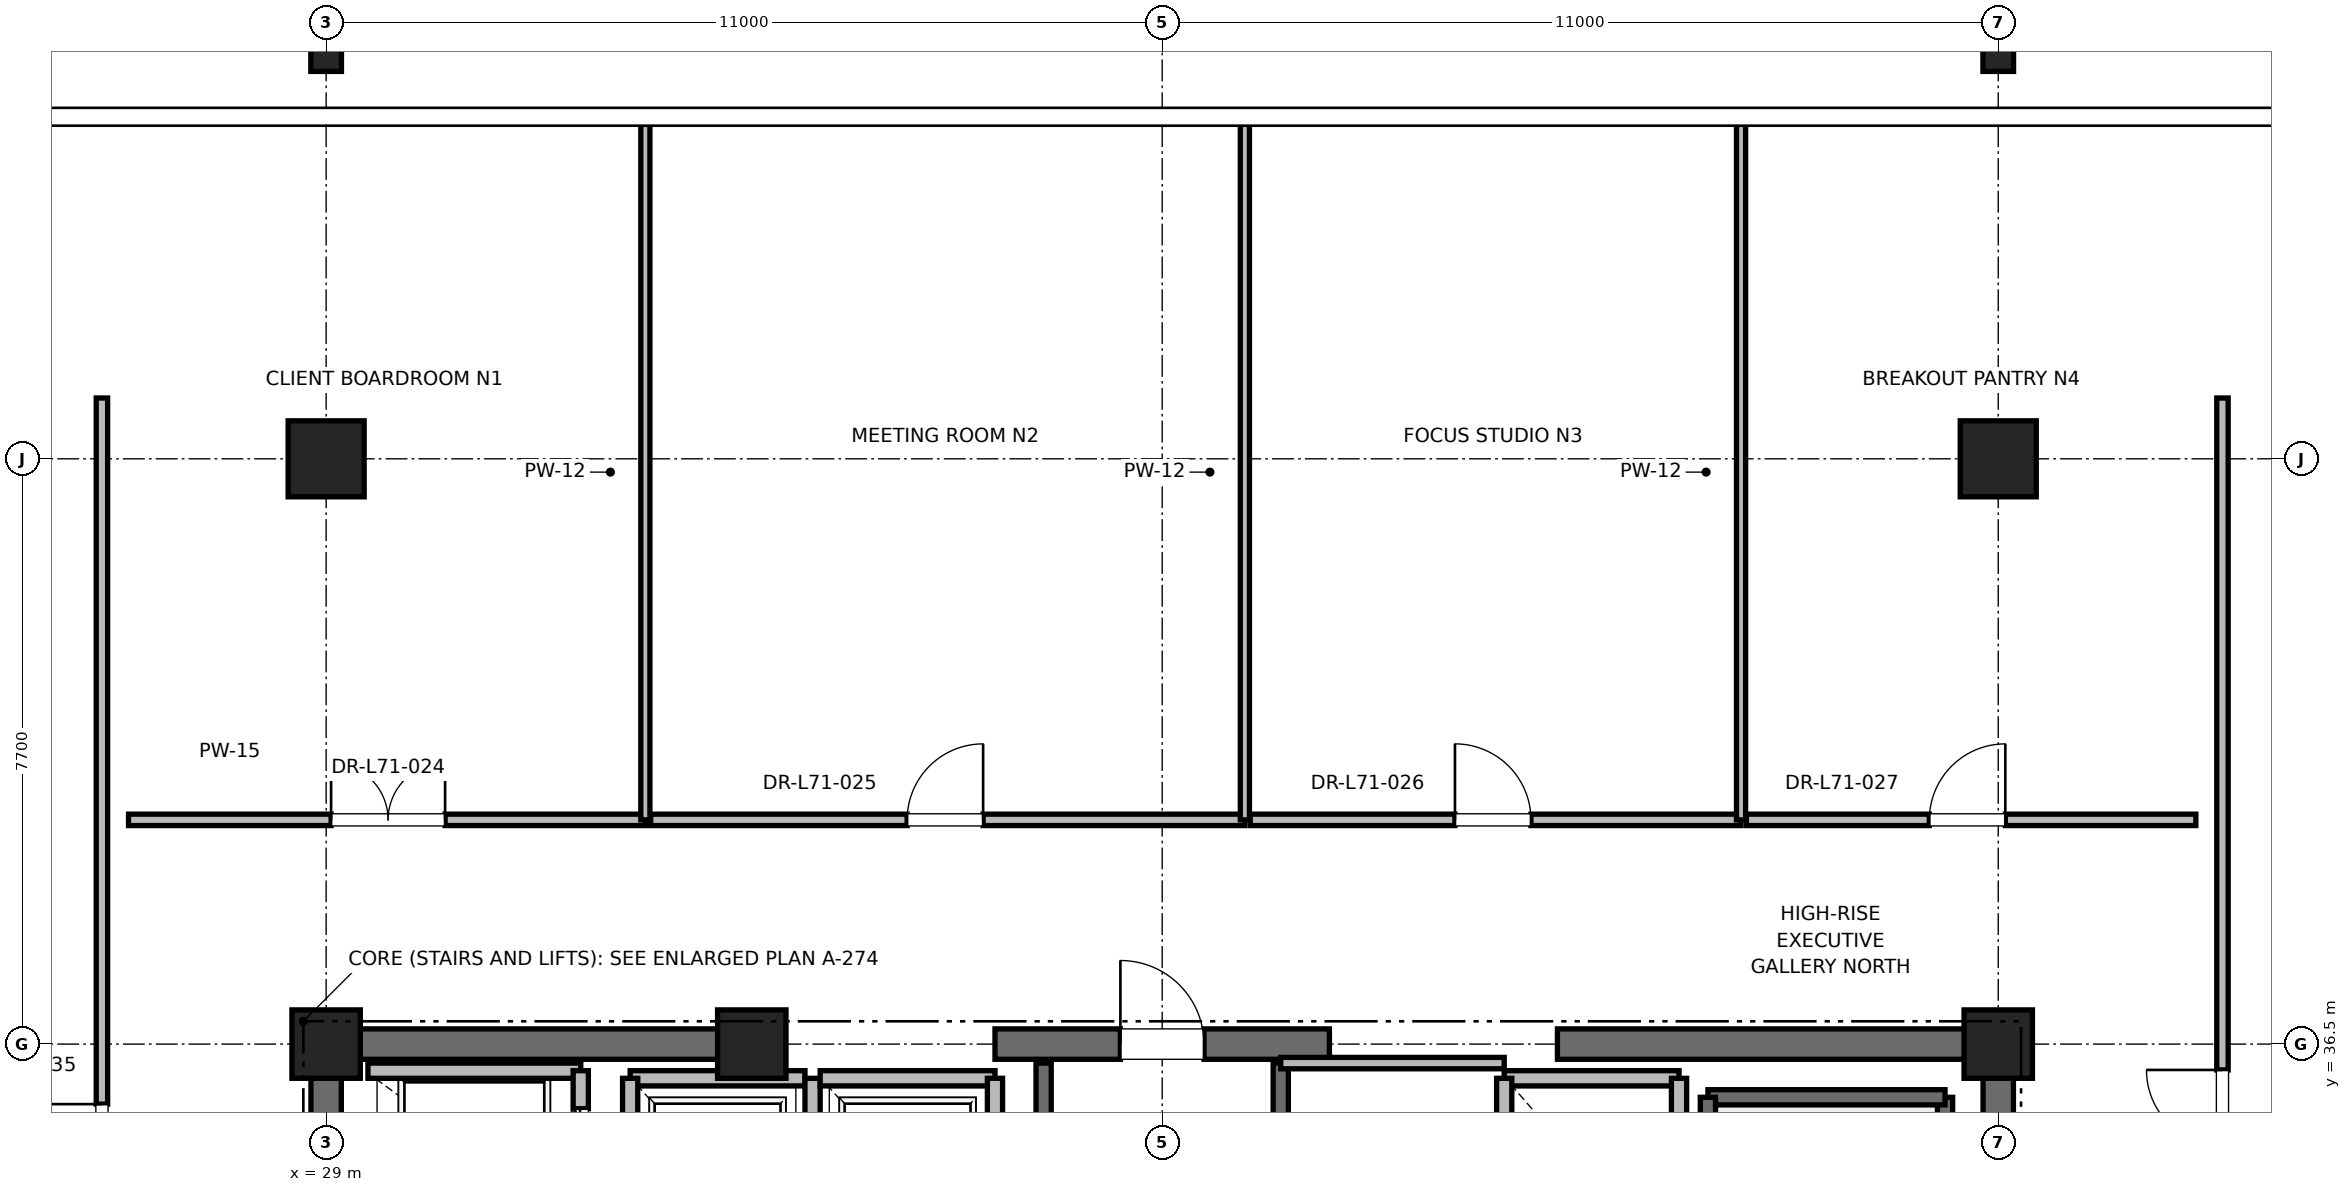
"""IFC4 building model, lengths in metres.
Left out: names, types, materials, properties, quantities, classifications, styles, units other than length and angle.
Written with IfcOpenShell. Run it as: python <this file> out.ifc"""

import sys

from ifc_helpers import new_model, si_unit, direction, frame, frame_2d, origin, origin_2d, place, context, subcontext, project, spatial, rectangle, i_section, extrude, element, fill, save


model = new_model("IFC4")
c1 = context("Model", 3, precision=1e-05, world=origin(), true_north=direction((0.0, 1.0)))
c2 = subcontext(c1, "Body", "Model", "MODEL_VIEW")
j1 = project(units=[si_unit("LENGTHUNIT", "METRE"), si_unit("PLANEANGLEUNIT", "RADIAN")], contexts=[c1])
p1 = place(None, origin())
s1 = spatial("IfcSite", under=j1, at=p1, CompositionType="ELEMENT")
p2 = place(p1, origin())
s2 = spatial("IfcBuilding", under=s1, at=p2, CompositionType="ELEMENT")
p3 = place(p2, frame((0.0, 0.0, 306.8)))
s3 = spatial("IfcBuildingStorey", under=s2, at=p3, CompositionType="ELEMENT", Elevation=306.8)
for number, where, z_axis, x_axis in (
    (1, (29.0, 44.2, 0.0), (0.0, 0.0, 1.0), (1.0, 0.0, 0.0)),
    (2, (51.0, 44.2, 0.0), (0.0, 0.0, 1.0), (1.0, 0.0, 0.0)),
):
    element("IfcColumn", number, at=place(p3, frame(where, z_axis=z_axis, x_axis=x_axis)), inside=s3, PredefinedType="COLUMN", context=c2, shape_type="SweptSolid", body=[
        extrude(rectangle(XDim=1.0, YDim=1.0, at=origin_2d()), origin(), (0.0, 0.0, 1.0), 4.0),
    ])
for number, where, z_axis, x_axis in (
    (3, (29.0, 49.5, 0.0), (0.0, 0.0, 1.0), (1.0, 0.0, 0.0)),
    (4, (51.0, 49.5, 0.0), (0.0, 0.0, 1.0), (1.0, 0.0, 0.0)),
):
    element("IfcColumn", number, at=place(p3, frame(where, z_axis=z_axis, x_axis=x_axis)), inside=s3, PredefinedType="COLUMN", context=c2, shape_type="SweptSolid", body=[
        extrude(i_section(OverallWidth=0.403, OverallDepth=0.406, WebThickness=0.027, FlangeThickness=0.043, FilletRadius=0.015, at=origin_2d()), origin(), (0.0, 0.0, 1.0), 4.0),
    ])
for number, where, z_axis, x_axis in (
    (5, (29.0, 36.5, 0.0), (0.0, 0.0, 1.0), (1.0, 0.0, 0.0)),
    (6, (51.0, 36.5, 0.0), (0.0, 0.0, 1.0), (1.0, 0.0, 0.0)),
    (7, (34.6, 36.5, 0.0), (0.0, 0.0, 1.0), (1.0, 0.0, 0.0)),
):
    element("IfcColumn", number, at=place(p3, frame(where, z_axis=z_axis, x_axis=x_axis)), inside=s3, PredefinedType="PILASTER", context=c2, shape_type="SweptSolid", body=[
        extrude(rectangle(XDim=0.9, YDim=0.9, at=origin_2d()), origin(), (0.0, 0.0, 1.0), 4.0),
    ])
p4 = place(p3, frame((29.0, 36.5, 0.0), z_axis=(0.0, 0.0, 1.0), x_axis=(1.0, 0.0, 0.0)))
e8 = element("IfcWall", 8, at=p4, inside=s3, PredefinedType="SHEAR", context=c2, shape_type="SweptSolid", body=[
    extrude(rectangle(XDim=5.8, YDim=0.4, at=frame_2d((2.9, 0.0))), origin(), (0.0, 0.0, 1.0), 3.785),
])
p5 = place(p3, frame((37.8, 36.5, 0.0), z_axis=(0.0, 0.0, 1.0), x_axis=(1.0, 0.0, 0.0)))
e9 = element("IfcWall", 9, at=p5, inside=s3, PredefinedType="SHEAR", context=c2, shape_type="SweptSolid", body=[
    extrude(rectangle(XDim=4.4, YDim=0.4, at=frame_2d((2.2, 0.0))), origin(), (0.0, 0.0, 1.0), 3.785),
])
p6 = place(p5, frame((1.65, 0.0, 0.0)))
e10 = element("IfcOpeningElement", 10, at=p6, cuts=e9, PredefinedType="OPENING", context=c2, shape_type="SweptSolid", body=[
    extrude(rectangle(XDim=1.1, YDim=2.15, at=frame_2d((0.55, 1.075))), frame((0.0, 0.2, 0.0), z_axis=(0.0, -1.0, 0.0), x_axis=(1.0, 0.0, 0.0)), (0.0, 0.0, 1.0), 0.4),
])
for number, where, z_axis, x_axis in (
    (11, (45.2, 36.5, 0.0), (0.0, 0.0, 1.0), (1.0, 0.0, 0.0)),
    (12, (29.0, 30.7, 0.0), (0.0, 0.0, 1.0), (0.0, 1.0, 0.0)),
):
    element("IfcWall", number, at=place(p3, frame(where, z_axis=z_axis, x_axis=x_axis)), inside=s3, PredefinedType="SHEAR", context=c2, shape_type="SweptSolid", body=[
        extrude(rectangle(XDim=5.8, YDim=0.4, at=frame_2d((2.9, 0.0))), origin(), (0.0, 0.0, 1.0), 3.785),
    ])
p7 = place(p3, frame((51.0, 27.7, 0.0), z_axis=(0.0, 0.0, 1.0), x_axis=(0.0, 1.0, 0.0)))
e13 = element("IfcWall", 13, at=p7, inside=s3, PredefinedType="SHEAR", context=c2, shape_type="SweptSolid", body=[
    extrude(rectangle(XDim=8.8, YDim=0.4, at=frame_2d((4.4, 0.0))), origin(), (0.0, 0.0, 1.0), 3.785),
])
p8 = place(p3, frame((50.3, 27.65, 0.0), z_axis=(0.0, 0.0, 1.0), x_axis=(0.0, 1.0, 0.0)))
e14 = element("IfcWall", 14, at=p8, inside=s3, PredefinedType="SOLIDWALL", context=c2, shape_type="SweptSolid", body=[
    extrude(rectangle(XDim=8.15, YDim=0.2, at=frame_2d((4.075, 0.0))), origin(), (0.0, 0.0, 1.0), 3.785),
])
p9 = place(p3, frame((47.18, 35.8, 0.0), z_axis=(0.0, 0.0, 1.0), x_axis=(1.0, 0.0, 0.0)))
e15 = element("IfcWall", 15, at=p9, inside=s3, PredefinedType="SOLIDWALL", context=c2, shape_type="SweptSolid", body=[
    extrude(rectangle(XDim=3.12, YDim=0.2, at=frame_2d((1.56, 0.0))), origin(), (0.0, 0.0, 1.0), 3.785),
])
p10 = place(p3, frame((47.18, 27.62, 0.0), z_axis=(0.0, 0.0, 1.0), x_axis=(0.0, 1.0, 0.0)))
e16 = element("IfcWall", 16, at=p10, inside=s3, PredefinedType="SOLIDWALL", context=c2, shape_type="SweptSolid", body=[
    extrude(rectangle(XDim=8.18, YDim=0.2, at=frame_2d((4.09, 0.0))), origin(), (0.0, 0.0, 1.0), 3.785),
])
p11 = place(p3, frame((38.44, 27.38, 0.0), z_axis=(0.0, 0.0, 1.0), x_axis=(0.0, 1.0, 0.0)))
e17 = element("IfcWall", 17, at=p11, inside=s3, PredefinedType="SOLIDWALL", context=c2, shape_type="SweptSolid", body=[
    extrude(rectangle(XDim=8.87, YDim=0.2, at=frame_2d((4.435, 0.0))), origin(), (0.0, 0.0, 1.0), 3.785),
])
p12 = place(p3, frame((41.56, 27.68, 0.0), z_axis=(0.0, 0.0, 1.0), x_axis=(0.0, 1.0, 0.0)))
e18 = element("IfcWall", 18, at=p12, inside=s3, PredefinedType="SOLIDWALL", context=c2, shape_type="SweptSolid", body=[
    extrude(rectangle(XDim=8.57, YDim=0.2, at=frame_2d((4.285, 0.0))), origin(), (0.0, 0.0, 1.0), 3.785),
])
p13 = place(p3, frame((32.35, 36.15, 0.0), z_axis=(0.0, 0.0, 1.0), x_axis=(-1.0, 0.0, 0.0)))
e19 = element("IfcWall", 19, at=p13, inside=s3, PredefinedType="SOLIDWALL", context=c2, shape_type="SweptSolid", body=[
    extrude(rectangle(XDim=2.8, YDim=0.2, at=frame_2d((1.4, 0.0))), origin(), (0.0, 0.0, 1.0), 3.22),
])
p14 = place(p3, frame((32.35, 34.05, 0.0), z_axis=(0.0, 0.0, 1.0), x_axis=(0.0, 1.0, 0.0)))
e20 = element("IfcWall", 20, at=p14, inside=s3, PredefinedType="SOLIDWALL", context=c2, shape_type="SweptSolid", body=[
    extrude(rectangle(XDim=2.1, YDim=0.2, at=frame_2d((1.05, 0.0))), origin(), (0.0, 0.0, 1.0), 3.785),
])
p15 = place(p14, frame((0.5, 0.0, 0.0)))
e21 = element("IfcOpeningElement", 21, at=p15, cuts=e20, PredefinedType="OPENING", context=c2, shape_type="SweptSolid", body=[
    extrude(rectangle(XDim=1.1, YDim=2.2, at=frame_2d((0.55, 1.1))), frame((0.0, 0.1, 0.0), z_axis=(0.0, -1.0, 0.0), x_axis=(1.0, 0.0, 0.0)), (0.0, 0.0, 1.0), 0.2),
])
p16 = place(p3, frame((35.3, 36.05, 0.0), z_axis=(0.0, 0.0, 1.0), x_axis=(-1.0, 0.0, 0.0)))
e22 = element("IfcWall", 22, at=p16, inside=s3, PredefinedType="SOLIDWALL", context=c2, shape_type="SweptSolid", body=[
    extrude(rectangle(XDim=2.3, YDim=0.2, at=frame_2d((1.15, 0.0))), origin(), (0.0, 0.0, 1.0), 2.865),
])
p17 = place(p3, frame((33.0, 36.05, 0.0), z_axis=(0.0, 0.0, 1.0), x_axis=(0.0, -1.0, 0.0)))
e23 = element("IfcWall", 23, at=p17, inside=s3, PredefinedType="SOLIDWALL", context=c2, shape_type="SweptSolid", body=[
    extrude(rectangle(XDim=2.6, YDim=0.2, at=frame_2d((1.3, 0.0))), origin(), (0.0, 0.0, 1.0), 3.785),
])
p18 = place(p3, frame((35.4, 33.45, 0.0), z_axis=(0.0, 0.0, 1.0), x_axis=(0.0, 1.0, 0.0)))
e24 = element("IfcWall", 24, at=p18, inside=s3, PredefinedType="SOLIDWALL", context=c2, shape_type="SweptSolid", body=[
    extrude(rectangle(XDim=2.6, YDim=0.2, at=frame_2d((1.3, 0.0))), origin(), (0.0, 0.0, 1.0), 2.865),
])
p19 = place(p3, frame((37.8, 36.05, 0.0), z_axis=(0.0, 0.0, 1.0), x_axis=(-1.0, 0.0, 0.0)))
e25 = element("IfcWall", 25, at=p19, inside=s3, PredefinedType="SOLIDWALL", context=c2, shape_type="SweptSolid", body=[
    extrude(rectangle(XDim=2.3, YDim=0.2, at=frame_2d((1.15, 0.0))), origin(), (0.0, 0.0, 1.0), 2.865),
])
p20 = place(p3, frame((37.8, 33.45, 0.0), z_axis=(0.0, 0.0, 1.0), x_axis=(0.0, 1.0, 0.0)))
e26 = element("IfcWall", 26, at=p20, inside=s3, PredefinedType="SOLIDWALL", context=c2, shape_type="SweptSolid", body=[
    extrude(rectangle(XDim=2.6, YDim=0.2, at=frame_2d((1.3, 0.0))), origin(), (0.0, 0.0, 1.0), 2.865),
])
p21 = place(p3, frame((46.8, 36.05, 0.0), z_axis=(0.0, 0.0, 1.0), x_axis=(-1.0, 0.0, 0.0)))
e27 = element("IfcWall", 27, at=p21, inside=s3, PredefinedType="SOLIDWALL", context=c2, shape_type="SweptSolid", body=[
    extrude(rectangle(XDim=2.3, YDim=0.2, at=frame_2d((1.15, 0.0))), origin(), (0.0, 0.0, 1.0), 2.865),
])
p22 = place(p3, frame((44.5, 36.05, 0.0), z_axis=(0.0, 0.0, 1.0), x_axis=(0.0, -1.0, 0.0)))
e28 = element("IfcWall", 28, at=p22, inside=s3, PredefinedType="SOLIDWALL", context=c2, shape_type="SweptSolid", body=[
    extrude(rectangle(XDim=2.6, YDim=0.2, at=frame_2d((1.3, 0.0))), origin(), (0.0, 0.0, 1.0), 2.865),
])
p23 = place(p3, frame((46.8, 33.45, 0.0), z_axis=(0.0, 0.0, 1.0), x_axis=(0.0, 1.0, 0.0)))
e29 = element("IfcWall", 29, at=p23, inside=s3, PredefinedType="SOLIDWALL", context=c2, shape_type="SweptSolid", body=[
    extrude(rectangle(XDim=2.6, YDim=0.2, at=frame_2d((1.3, 0.0))), origin(), (0.0, 0.0, 1.0), 3.785),
])
p24 = place(p3, frame((41.56, 36.25, 0.0), z_axis=(0.0, 0.0, 1.0), x_axis=(1.0, 0.0, 0.0)))
e30 = element("IfcWall", 30, at=p24, inside=s3, PredefinedType="PARTITIONING", context=c2, shape_type="SweptSolid", body=[
    extrude(rectangle(XDim=2.94, YDim=0.15, at=frame_2d((1.47, 0.0))), origin(), (0.0, 0.0, 1.0), 2.85),
])
p25 = place(p3, frame((26.4, 39.45, 0.0), z_axis=(0.0, 0.0, 1.0), x_axis=(1.0, 0.0, 0.0)))
e31 = element("IfcWall", 31, at=p25, inside=s3, PredefinedType="PARTITIONING", context=c2, shape_type="SweptSolid", body=[
    extrude(rectangle(XDim=6.8, YDim=0.15, at=frame_2d((3.4, 0.0))), origin(), (0.0, 0.0, 1.0), 2.85),
])
p26 = place(p25, frame((2.665, 0.0, 0.0)))
e32 = element("IfcOpeningElement", 32, at=p26, cuts=e31, PredefinedType="OPENING", context=c2, shape_type="SweptSolid", body=[
    extrude(rectangle(XDim=1.5, YDim=2.25, at=frame_2d((0.75, 1.125))), frame((0.0, 0.075, 0.0), z_axis=(0.0, -1.0, 0.0), x_axis=(1.0, 0.0, 0.0)), (0.0, 0.0, 1.0), 0.15),
])
p27 = place(p3, frame((33.2, 39.45, 0.0), z_axis=(0.0, 0.0, 1.0), x_axis=(0.0, 1.0, 0.0)))
e33 = element("IfcWall", 33, at=p27, inside=s3, PredefinedType="PARTITIONING", context=c2, shape_type="SweptSolid", body=[
    extrude(rectangle(XDim=9.15, YDim=0.12, at=frame_2d((4.575, 0.0))), origin(), (0.0, 0.0, 1.0), 2.415),
])
p28 = place(p3, frame((33.27, 39.45, 0.0), z_axis=(0.0, 0.0, 1.0), x_axis=(1.0, 0.0, 0.0)))
e34 = element("IfcWall", 34, at=p28, inside=s3, PredefinedType="PARTITIONING", context=c2, shape_type="SweptSolid", body=[
    extrude(rectangle(XDim=7.818, YDim=0.15, at=frame_2d((3.909, 0.0))), origin(), (0.0, 0.0, 1.0), 2.85),
])
p29 = place(p28, frame((3.374, 0.0, 0.0)))
e35 = element("IfcOpeningElement", 35, at=p29, cuts=e34, PredefinedType="OPENING", context=c2, shape_type="SweptSolid", body=[
    extrude(rectangle(XDim=1.0, YDim=2.15, at=frame_2d((0.5, 1.075))), frame((0.0, 0.075, 0.0), z_axis=(0.0, -1.0, 0.0), x_axis=(1.0, 0.0, 0.0)), (0.0, 0.0, 1.0), 0.15),
])
p30 = place(p3, frame((41.088, 39.45, 0.0), z_axis=(0.0, 0.0, 1.0), x_axis=(0.0, 1.0, 0.0)))
e36 = element("IfcWall", 36, at=p30, inside=s3, PredefinedType="PARTITIONING", context=c2, shape_type="SweptSolid", body=[
    extrude(rectangle(XDim=9.15, YDim=0.12, at=frame_2d((4.575, 0.0))), origin(), (0.0, 0.0, 1.0), 2.415),
])
p31 = place(p3, frame((41.158, 39.45, 0.0), z_axis=(0.0, 0.0, 1.0), x_axis=(1.0, 0.0, 0.0)))
e37 = element("IfcWall", 37, at=p31, inside=s3, PredefinedType="PARTITIONING", context=c2, shape_type="SweptSolid", body=[
    extrude(rectangle(XDim=6.458, YDim=0.15, at=frame_2d((3.229, 0.0))), origin(), (0.0, 0.0, 1.0), 2.85),
])
p32 = place(p31, frame((2.694, 0.0, 0.0)))
e38 = element("IfcOpeningElement", 38, at=p32, cuts=e37, PredefinedType="OPENING", context=c2, shape_type="SweptSolid", body=[
    extrude(rectangle(XDim=1.0, YDim=2.15, at=frame_2d((0.5, 1.075))), frame((0.0, 0.075, 0.0), z_axis=(0.0, -1.0, 0.0), x_axis=(1.0, 0.0, 0.0)), (0.0, 0.0, 1.0), 0.15),
])
p33 = place(p3, frame((47.616, 39.45, 0.0), z_axis=(0.0, 0.0, 1.0), x_axis=(0.0, 1.0, 0.0)))
e39 = element("IfcWall", 39, at=p33, inside=s3, PredefinedType="PARTITIONING", context=c2, shape_type="SweptSolid", body=[
    extrude(rectangle(XDim=9.15, YDim=0.12, at=frame_2d((4.575, 0.0))), origin(), (0.0, 0.0, 1.0), 2.415),
])
p34 = place(p3, frame((47.686, 39.45, 0.0), z_axis=(0.0, 0.0, 1.0), x_axis=(1.0, 0.0, 0.0)))
e40 = element("IfcWall", 40, at=p34, inside=s3, PredefinedType="PARTITIONING", context=c2, shape_type="SweptSolid", body=[
    extrude(rectangle(XDim=5.914, YDim=0.15, at=frame_2d((2.957, 0.0))), origin(), (0.0, 0.0, 1.0), 2.85),
])
p35 = place(p34, frame((2.407, 0.0, 0.0)))
e41 = element("IfcOpeningElement", 41, at=p35, cuts=e40, PredefinedType="OPENING", context=c2, shape_type="SweptSolid", body=[
    extrude(rectangle(XDim=1.0, YDim=2.15, at=frame_2d((0.5, 1.075))), frame((0.0, 0.075, 0.0), z_axis=(0.0, -1.0, 0.0), x_axis=(1.0, 0.0, 0.0)), (0.0, 0.0, 1.0), 0.15),
])
p36 = place(p3, frame((26.05, 33.52, 0.0), z_axis=(0.0, 0.0, 1.0), x_axis=(0.0, 1.0, 0.0)))
e42 = element("IfcWall", 42, at=p36, inside=s3, PredefinedType="PARTITIONING", context=c2, shape_type="SweptSolid", body=[
    extrude(rectangle(XDim=11.48, YDim=0.15, at=frame_2d((5.74, 0.0))), origin(), (0.0, 0.0, 1.0), 2.85),
])
p37 = place(p36, frame((0.69, 0.0, 0.0)))
e43 = element("IfcOpeningElement", 43, at=p37, cuts=e42, PredefinedType="OPENING", context=c2, shape_type="SweptSolid", body=[
    extrude(rectangle(XDim=1.5, YDim=2.25, at=frame_2d((0.75, 1.125))), frame((0.0, 0.075, 0.0), z_axis=(0.0, -1.0, 0.0), x_axis=(1.0, 0.0, 0.0)), (0.0, 0.0, 1.0), 0.15),
])
p38 = place(p3, frame((53.95, 34.92, 0.0), z_axis=(0.0, 0.0, 1.0), x_axis=(0.0, 1.0, 0.0)))
e44 = element("IfcWall", 44, at=p38, inside=s3, PredefinedType="PARTITIONING", context=c2, shape_type="SweptSolid", body=[
    extrude(rectangle(XDim=10.08, YDim=0.15, at=frame_2d((5.04, 0.0))), origin(), (0.0, 0.0, 1.0), 2.85),
])
p39 = place(p38, frame((0.24, 0.0, 0.0)))
e45 = element("IfcOpeningElement", 45, at=p39, cuts=e44, PredefinedType="OPENING", context=c2, shape_type="SweptSolid", body=[
    extrude(rectangle(XDim=1.0, YDim=2.15, at=frame_2d((0.5, 1.075))), frame((0.0, 0.075, 0.0), z_axis=(0.0, -1.0, 0.0), x_axis=(1.0, 0.0, 0.0)), (0.0, 0.0, 1.0), 0.15),
])
p40 = place(p6, origin())
e46 = element("IfcDoor", 46, at=p40, inside=s3, OperationType="SINGLE_SWING_LEFT", PredefinedType="DOOR", context=c2, shape_type="SweptSolid", body=[
    extrude(rectangle(XDim=1.1, YDim=2.15, at=frame_2d((0.55, 1.075))), frame((0.0, 0.025, 0.0), z_axis=(0.0, -1.0, 0.0), x_axis=(1.0, 0.0, 0.0)), (0.0, 0.0, 1.0), 0.05),
])
fill(e10, e46)
p41 = place(p15, origin())
e47 = element("IfcDoor", 47, at=p41, inside=s3, OperationType="SLIDING_TO_RIGHT", PredefinedType="DOOR", context=c2, shape_type="SweptSolid", body=[
    extrude(rectangle(XDim=1.1, YDim=2.2, at=frame_2d((0.55, 1.1))), frame((0.0, 0.025, 0.0), z_axis=(0.0, -1.0, 0.0), x_axis=(1.0, 0.0, 0.0)), (0.0, 0.0, 1.0), 0.05),
])
fill(e21, e47)
p42 = place(p26, origin())
e48 = element("IfcDoor", 48, at=p42, inside=s3, OperationType="DOUBLE_DOOR_SINGLE_SWING", PredefinedType="DOOR", context=c2, shape_type="SweptSolid", body=[
    extrude(rectangle(XDim=1.5, YDim=2.25, at=frame_2d((0.75, 1.125))), frame((0.0, 0.025, 0.0), z_axis=(0.0, -1.0, 0.0), x_axis=(1.0, 0.0, 0.0)), (0.0, 0.0, 1.0), 0.05),
])
fill(e32, e48)
p43 = place(p29, origin())
e49 = element("IfcDoor", 49, at=p43, inside=s3, OperationType="SINGLE_SWING_RIGHT", PredefinedType="DOOR", context=c2, shape_type="SweptSolid", body=[
    extrude(rectangle(XDim=1.0, YDim=2.15, at=frame_2d((0.5, 1.075))), frame((0.0, 0.025, 0.0), z_axis=(0.0, -1.0, 0.0), x_axis=(1.0, 0.0, 0.0)), (0.0, 0.0, 1.0), 0.05),
])
fill(e35, e49)
p44 = place(p32, origin())
e50 = element("IfcDoor", 50, at=p44, inside=s3, OperationType="SINGLE_SWING_LEFT", PredefinedType="DOOR", context=c2, shape_type="SweptSolid", body=[
    extrude(rectangle(XDim=1.0, YDim=2.15, at=frame_2d((0.5, 1.075))), frame((0.0, 0.025, 0.0), z_axis=(0.0, -1.0, 0.0), x_axis=(1.0, 0.0, 0.0)), (0.0, 0.0, 1.0), 0.05),
])
fill(e38, e50)
p45 = place(p35, origin())
e51 = element("IfcDoor", 51, at=p45, inside=s3, OperationType="SINGLE_SWING_RIGHT", PredefinedType="DOOR", context=c2, shape_type="SweptSolid", body=[
    extrude(rectangle(XDim=1.0, YDim=2.15, at=frame_2d((0.5, 1.075))), frame((0.0, 0.025, 0.0), z_axis=(0.0, -1.0, 0.0), x_axis=(1.0, 0.0, 0.0)), (0.0, 0.0, 1.0), 0.05),
])
fill(e41, e51)
p46 = place(p37, origin())
e52 = element("IfcDoor", 52, at=p46, inside=s3, OperationType="DOUBLE_DOOR_SINGLE_SWING", PredefinedType="DOOR", context=c2, shape_type="SweptSolid", body=[
    extrude(rectangle(XDim=1.5, YDim=2.25, at=frame_2d((0.75, 1.125))), frame((0.0, 0.025, 0.0), z_axis=(0.0, -1.0, 0.0), x_axis=(1.0, 0.0, 0.0)), (0.0, 0.0, 1.0), 0.05),
])
fill(e43, e52)
p47 = place(p39, origin())
e53 = element("IfcDoor", 53, at=p47, inside=s3, OperationType="SINGLE_SWING_RIGHT", PredefinedType="DOOR", context=c2, shape_type="SweptSolid", body=[
    extrude(rectangle(XDim=1.0, YDim=2.15, at=frame_2d((0.5, 1.075))), frame((0.0, 0.025, 0.0), z_axis=(0.0, -1.0, 0.0), x_axis=(1.0, 0.0, 0.0)), (0.0, 0.0, 1.0), 0.05),
])
fill(e45, e53)
save(model, sys.argv[1])
